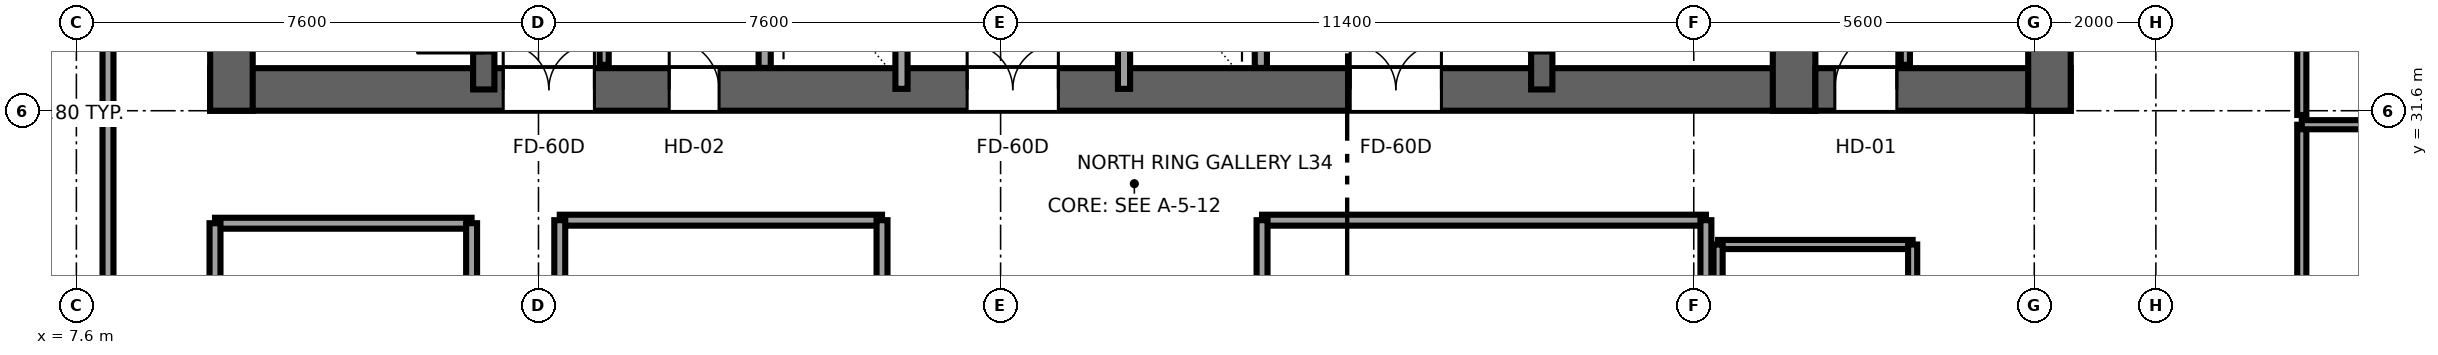
"""IFC4 building model, lengths in metres.
Left out: names, types, materials, properties, quantities, classifications, styles, units other than length and angle.
Written with IfcOpenShell. Run it as: python <this file> out.ifc"""

import sys

from ifc_helpers import new_model, si_unit, direction, frame, frame_2d, origin, place, context, subcontext, project, spatial, rectangle, extrude, source, transform, mapped, element, fill, save


model = new_model("IFC4")
c1 = context("Model", 3, precision=1e-05, world=origin(), true_north=direction((0.0, 1.0)))
c2 = subcontext(c1, "Body", "Model", "MODEL_VIEW")
j1 = project(units=[si_unit("LENGTHUNIT", "METRE"), si_unit("PLANEANGLEUNIT", "RADIAN")], contexts=[c1])
p1 = place(None, origin())
s1 = spatial("IfcSite", under=j1, at=p1, CompositionType="ELEMENT")
p2 = place(p1, origin())
s2 = spatial("IfcBuilding", under=s1, at=p2, CompositionType="ELEMENT")
p3 = place(p2, frame((0.0, 0.0, 132.85)))
s3 = spatial("IfcBuildingStorey", under=s2, at=p3, CompositionType="ELEMENT", Elevation=132.85)
p4 = place(p3, frame((9.8, 31.95, 0.0), z_axis=(0.0, 0.0, 1.0), x_axis=(1.0, 0.0, 0.0)))
e1 = element("IfcWall", 1, at=p4, inside=s3, PredefinedType="SHEAR", context=c2, shape_type="SweptSolid", body=[
    extrude(rectangle(XDim=26.4, YDim=0.7, at=frame_2d((13.2, 0.0))), origin(), (0.0, 0.0, 1.0), 3.55),
])
p5 = place(p4, frame((6.32, 0.0, 0.0), z_axis=(0.0, 0.0, 1.0), x_axis=(-1.0, 0.0, 0.0)))
e2 = element("IfcOpeningElement", 2, at=p5, cuts=e1, PredefinedType="OPENING", context=c2, shape_type="SweptSolid", body=[
    extrude(rectangle(XDim=1.5, YDim=2.04, at=frame_2d((0.75, 1.02))), frame((0.0, 0.36, 0.0), z_axis=(0.0, -1.0, 0.0), x_axis=(1.0, 0.0, 0.0)), (0.0, 0.0, 1.0), 0.72),
])
p6 = place(p4, frame((13.95, 0.0, 0.0), z_axis=(0.0, 0.0, 1.0), x_axis=(-1.0, 0.0, 0.0)))
e3 = element("IfcOpeningElement", 3, at=p6, cuts=e1, PredefinedType="OPENING", context=c2, shape_type="SweptSolid", body=[
    extrude(rectangle(XDim=1.5, YDim=2.04, at=frame_2d((0.75, 1.02))), frame((0.0, 0.36, 0.0), z_axis=(0.0, -1.0, 0.0), x_axis=(1.0, 0.0, 0.0)), (0.0, 0.0, 1.0), 0.72),
])
p7 = place(p4, frame((20.25, 0.0, 0.0), z_axis=(0.0, 0.0, 1.0), x_axis=(-1.0, 0.0, 0.0)))
e4 = element("IfcOpeningElement", 4, at=p7, cuts=e1, PredefinedType="OPENING", context=c2, shape_type="SweptSolid", body=[
    extrude(rectangle(XDim=1.5, YDim=2.04, at=frame_2d((0.75, 1.02))), frame((0.0, 0.36, 0.0), z_axis=(0.0, -1.0, 0.0), x_axis=(1.0, 0.0, 0.0)), (0.0, 0.0, 1.0), 0.72),
])
p8 = place(p4, frame((8.37, 0.0, 0.0), z_axis=(0.0, 0.0, 1.0), x_axis=(-1.0, 0.0, 0.0)))
e5 = element("IfcOpeningElement", 5, at=p8, cuts=e1, PredefinedType="OPENING", context=c2, shape_type="SweptSolid", body=[
    extrude(rectangle(XDim=0.82, YDim=2.01, at=frame_2d((0.41, 1.005))), frame((0.0, 0.36, 0.0), z_axis=(0.0, -1.0, 0.0), x_axis=(1.0, 0.0, 0.0)), (0.0, 0.0, 1.0), 0.72),
])
for number, where, z_axis, x_axis in (
    (6, (10.15, 31.6, 0.0), (0.0, 0.0, 1.0), (0.0, 1.0, 0.0)),
    (7, (35.85, 31.6, 0.0), (0.0, 0.0, 1.0), (0.0, 1.0, 0.0)),
):
    element("IfcWall", number, at=place(p3, frame(where, z_axis=z_axis, x_axis=x_axis)), inside=s3, PredefinedType="SHEAR", context=c2, shape_type="SweptSolid", body=[
        extrude(rectangle(XDim=13.6, YDim=0.7, at=frame_2d((6.8, 0.0))), origin(), (0.0, 0.0, 1.0), 3.55),
    ])
p9 = place(p3, frame((14.3, 31.95, 0.0), z_axis=(0.0, 0.0, 1.0), x_axis=(0.0, 1.0, 0.0)))
e8 = element("IfcWall", 8, at=p9, inside=s3, PredefinedType="SHEAR", context=c2, shape_type="SweptSolid", body=[
    extrude(rectangle(XDim=12.9, YDim=0.35, at=frame_2d((6.45, 0.0))), origin(), (0.0, 0.0, 1.0), 3.55),
])
p10 = place(p9, frame((0.6, 0.0, 0.0)))
e9 = element("IfcOpeningElement", 9, at=p10, cuts=e8, PredefinedType="OPENING", context=c2, shape_type="SweptSolid", body=[
    extrude(rectangle(XDim=1.1, YDim=2.12, at=frame_2d((0.55, 1.06))), frame((0.0, 0.185, 0.0), z_axis=(0.0, -1.0, 0.0), x_axis=(1.0, 0.0, 0.0)), (0.0, 0.0, 1.0), 0.37),
])
p11 = place(p3, frame((31.7, 31.95, 0.0), z_axis=(0.0, 0.0, 1.0), x_axis=(0.0, 1.0, 0.0)))
e10 = element("IfcWall", 10, at=p11, inside=s3, PredefinedType="SHEAR", context=c2, shape_type="SweptSolid", body=[
    extrude(rectangle(XDim=12.9, YDim=0.35, at=frame_2d((6.45, 0.0))), origin(), (0.0, 0.0, 1.0), 3.55),
])
p12 = place(p11, frame((1.7, 0.0, 0.0), z_axis=(0.0, 0.0, 1.0), x_axis=(-1.0, 0.0, 0.0)))
e11 = element("IfcOpeningElement", 11, at=p12, cuts=e10, PredefinedType="OPENING", context=c2, shape_type="SweptSolid", body=[
    extrude(rectangle(XDim=1.1, YDim=2.12, at=frame_2d((0.55, 1.06))), frame((0.0, 0.185, 0.0), z_axis=(0.0, -1.0, 0.0), x_axis=(1.0, 0.0, 0.0)), (0.0, 0.0, 1.0), 0.37),
])
p13 = place(p3, frame((36.2, 31.95, 0.0), z_axis=(0.0, 0.0, 1.0), x_axis=(1.0, 0.0, 0.0)))
e12 = element("IfcWall", 12, at=p13, inside=s3, PredefinedType="SHEAR", context=c2, shape_type="SweptSolid", body=[
    extrude(rectangle(XDim=4.2, YDim=0.7, at=frame_2d((2.1, 0.0))), origin(), (0.0, 0.0, 1.0), 3.55),
])
p14 = place(p13, frame((1.34, 0.0, 0.0), z_axis=(0.0, 0.0, 1.0), x_axis=(-1.0, 0.0, 0.0)))
e13 = element("IfcOpeningElement", 13, at=p14, cuts=e12, PredefinedType="OPENING", context=c2, shape_type="SweptSolid", body=[
    extrude(rectangle(XDim=1.02, YDim=2.03, at=frame_2d((0.51, 1.015))), frame((0.0, 0.36, 0.0), z_axis=(0.0, -1.0, 0.0), x_axis=(1.0, 0.0, 0.0)), (0.0, 0.0, 1.0), 0.72),
])
p15 = place(p3, frame((40.05, 31.6, 0.0), z_axis=(0.0, 0.0, 1.0), x_axis=(0.0, 1.0, 0.0)))
e14 = element("IfcWall", 14, at=p15, inside=s3, PredefinedType="SHEAR", context=c2, shape_type="SweptSolid", body=[
    extrude(rectangle(XDim=13.6, YDim=0.7, at=frame_2d((6.8, 0.0))), origin(), (0.0, 0.0, 1.0), 3.55),
])
for number, where, z_axis, x_axis in (
    (15, (18.92, 32.304, 0.0), (0.0, 0.0, 1.0), (0.0, 1.0, 0.0)),
    (16, (27.08, 32.304, 0.0), (0.0, 0.0, 1.0), (0.0, 1.0, 0.0)),
):
    element("IfcWall", number, at=place(p3, frame(where, z_axis=z_axis, x_axis=x_axis)), inside=s3, PredefinedType="SOLIDWALL", context=c2, shape_type="SweptSolid", body=[
        extrude(rectangle(XDim=3.846, YDim=0.2, at=frame_2d((1.923, 0.0))), origin(), (0.0, 0.0, 1.0), 3.37),
    ])
p16 = place(p3, frame((21.17, 31.96, 0.0), z_axis=(0.0, 0.0, 1.0), x_axis=(0.0, 1.0, 0.0)))
e17 = element("IfcWall", 17, at=p16, inside=s3, PredefinedType="SOLIDWALL", context=c2, shape_type="SweptSolid", body=[
    extrude(rectangle(XDim=12.58, YDim=0.2, at=frame_2d((6.29, 0.0))), origin(), (0.0, 0.0, 1.0), 3.37),
])
p17 = place(p16, frame((5.74, 0.0, 0.0)))
e18 = element("IfcOpeningElement", 18, at=p17, cuts=e17, PredefinedType="OPENING", context=c2, shape_type="SweptSolid", body=[
    extrude(rectangle(XDim=1.1, YDim=2.12, at=frame_2d((0.55, 1.06))), frame((0.0, 0.11, 0.0), z_axis=(0.0, -1.0, 0.0), x_axis=(1.0, 0.0, 0.0)), (0.0, 0.0, 1.0), 0.22),
])
p18 = place(p16, frame((8.24, 0.0, 0.0)))
e19 = element("IfcOpeningElement", 19, at=p18, cuts=e17, PredefinedType="OPENING", context=c2, shape_type="SweptSolid", body=[
    extrude(rectangle(XDim=1.1, YDim=2.12, at=frame_2d((0.55, 1.06))), frame((0.0, 0.11, 0.0), z_axis=(0.0, -1.0, 0.0), x_axis=(1.0, 0.0, 0.0)), (0.0, 0.0, 1.0), 0.22),
])
p19 = place(p3, frame((24.83, 31.96, 0.0), z_axis=(0.0, 0.0, 1.0), x_axis=(0.0, 1.0, 0.0)))
e20 = element("IfcWall", 20, at=p19, inside=s3, PredefinedType="SOLIDWALL", context=c2, shape_type="SweptSolid", body=[
    extrude(rectangle(XDim=12.58, YDim=0.2, at=frame_2d((6.29, 0.0))), origin(), (0.0, 0.0, 1.0), 3.37),
])
p20 = place(p19, frame((5.74, 0.0, 0.0)))
e21 = element("IfcOpeningElement", 21, at=p20, cuts=e20, PredefinedType="OPENING", context=c2, shape_type="SweptSolid", body=[
    extrude(rectangle(XDim=1.1, YDim=2.12, at=frame_2d((0.55, 1.06))), frame((0.0, 0.11, 0.0), z_axis=(0.0, -1.0, 0.0), x_axis=(1.0, 0.0, 0.0)), (0.0, 0.0, 1.0), 0.22),
])
p21 = place(p19, frame((8.24, 0.0, 0.0)))
e22 = element("IfcOpeningElement", 22, at=p21, cuts=e20, PredefinedType="OPENING", context=c2, shape_type="SweptSolid", body=[
    extrude(rectangle(XDim=1.1, YDim=2.12, at=frame_2d((0.55, 1.06))), frame((0.0, 0.11, 0.0), z_axis=(0.0, -1.0, 0.0), x_axis=(1.0, 0.0, 0.0)), (0.0, 0.0, 1.0), 0.22),
])
p22 = place(p3, frame((16.28, 32.355, 0.0), z_axis=(0.0, 0.0, 1.0), x_axis=(0.0, 1.0, 0.0)))
e23 = element("IfcWall", 23, at=p22, inside=s3, PredefinedType="PARTITIONING", context=c2, shape_type="SweptSolid", body=[
    extrude(rectangle(XDim=0.865, YDim=0.15, at=frame_2d((0.433, 0.0))), origin(), (0.0, 0.0, 1.0), 3.37),
])
p23 = place(p3, frame((37.68, 32.355, 0.0), z_axis=(0.0, 0.0, 1.0), x_axis=(0.0, 1.0, 0.0)))
e24 = element("IfcWall", 24, at=p23, inside=s3, PredefinedType="PARTITIONING", context=c2, shape_type="SweptSolid", body=[
    extrude(rectangle(XDim=3.845, YDim=0.15, at=frame_2d((1.922, 0.0))), origin(), (0.0, 0.0, 1.0), 3.37),
])
p24 = place(p23, frame((1.413, 0.0, 0.0)))
e25 = element("IfcOpeningElement", 25, at=p24, cuts=e24, PredefinedType="OPENING", context=c2, shape_type="SweptSolid", body=[
    extrude(rectangle(XDim=1.02, YDim=2.03, at=frame_2d((0.51, 1.015))), frame((0.0, 0.085, 0.0), z_axis=(0.0, -1.0, 0.0), x_axis=(1.0, 0.0, 0.0)), (0.0, 0.0, 1.0), 0.17),
])
p25 = place(p3, frame((8.12, 22.3, 0.0), z_axis=(0.0, 0.0, 1.0), x_axis=(0.0, 1.0, 0.0)))
e26 = element("IfcWall", 26, at=p25, inside=s3, PredefinedType="PARTITIONING", context=c2, shape_type="SweptSolid", body=[
    extrude(rectangle(XDim=13.5, YDim=0.18, at=frame_2d((6.75, 0.0))), origin(), (0.0, 0.0, 1.0), 3.37),
])
p26 = place(p25, frame((3.35, 0.0, 0.0)))
e27 = element("IfcOpeningElement", 27, at=p26, cuts=e26, PredefinedType="OPENING", context=c2, shape_type="SweptSolid", body=[
    extrude(rectangle(XDim=1.65, YDim=2.15, at=frame_2d((0.825, 1.075))), frame((0.0, 0.1, 0.0), z_axis=(0.0, -1.0, 0.0), x_axis=(1.0, 0.0, 0.0)), (0.0, 0.0, 1.0), 0.2),
])
p27 = place(p3, frame((44.2, 22.38, 0.0), z_axis=(0.0, 0.0, 1.0), x_axis=(0.0, 1.0, 0.0)))
e28 = element("IfcWall", 28, at=p27, inside=s3, PredefinedType="PARTITIONING", context=c2, shape_type="SweptSolid", body=[
    extrude(rectangle(XDim=8.99, YDim=0.15, at=frame_2d((4.495, 0.0))), origin(), (0.0, 0.0, 1.0), 3.37),
])
p28 = place(p27, frame((4.005, 0.0, 0.0)))
e29 = element("IfcOpeningElement", 29, at=p28, cuts=e28, PredefinedType="OPENING", context=c2, shape_type="SweptSolid", body=[
    extrude(rectangle(XDim=0.98, YDim=2.12, at=frame_2d((0.49, 1.06))), frame((0.0, 0.085, 0.0), z_axis=(0.0, -1.0, 0.0), x_axis=(1.0, 0.0, 0.0)), (0.0, 0.0, 1.0), 0.17),
])
p29 = place(p3, frame((44.2, 31.37, 0.0), z_axis=(0.0, 0.0, 1.0), x_axis=(1.0, 0.0, 0.0)))
e30 = element("IfcWall", 30, at=p29, inside=s3, PredefinedType="PARTITIONING", context=c2, shape_type="SweptSolid", body=[
    extrude(rectangle(XDim=10.03, YDim=0.15, at=frame_2d((5.015, 0.0))), origin(), (0.0, 0.0, 1.0), 3.37),
])
p30 = place(p3, frame((44.2, 31.53, 0.0), z_axis=(0.0, 0.0, 1.0), x_axis=(0.0, 1.0, 0.0)))
e31 = element("IfcWall", 31, at=p30, inside=s3, PredefinedType="PARTITIONING", context=c2, shape_type="SweptSolid", body=[
    extrude(rectangle(XDim=8.99, YDim=0.15, at=frame_2d((4.495, 0.0))), origin(), (0.0, 0.0, 1.0), 3.37),
])
p31 = place(p30, frame((4.005, 0.0, 0.0)))
e32 = element("IfcOpeningElement", 32, at=p31, cuts=e31, PredefinedType="OPENING", context=c2, shape_type="SweptSolid", body=[
    extrude(rectangle(XDim=0.98, YDim=2.12, at=frame_2d((0.49, 1.06))), frame((0.0, 0.085, 0.0), z_axis=(0.0, -1.0, 0.0), x_axis=(1.0, 0.0, 0.0)), (0.0, 0.0, 1.0), 0.17),
])
p32 = place(p3, frame((9.88, 29.75, 0.0), z_axis=(0.0, 0.0, 1.0), x_axis=(1.0, 0.0, 0.0)))
e33 = element("IfcWall", 33, at=p32, inside=s3, PredefinedType="PARTITIONING", context=c2, shape_type="SweptSolid", body=[
    extrude(rectangle(XDim=4.22, YDim=0.18, at=frame_2d((2.11, 0.0))), origin(), (0.0, 0.0, 1.0), 3.37),
])
for number, where, z_axis, x_axis in (
    (34, (9.88, 22.3, 0.0), (0.0, 0.0, 1.0), (0.0, 1.0, 0.0)),
    (35, (14.1, 22.3, 0.0), (0.0, 0.0, 1.0), (0.0, 1.0, 0.0)),
):
    element("IfcWall", number, at=place(p3, frame(where, z_axis=z_axis, x_axis=x_axis)), inside=s3, PredefinedType="PARTITIONING", context=c2, shape_type="SweptSolid", body=[
        extrude(rectangle(XDim=7.45, YDim=0.18, at=frame_2d((3.725, 0.0))), origin(), (0.0, 0.0, 1.0), 3.37),
    ])
p33 = place(p3, frame((27.1, 29.8, 0.0), z_axis=(0.0, 0.0, 1.0), x_axis=(1.0, 0.0, 0.0)))
e36 = element("IfcWall", 36, at=p33, inside=s3, PredefinedType="PARTITIONING", context=c2, shape_type="SweptSolid", body=[
    extrude(rectangle(XDim=7.3, YDim=0.18, at=frame_2d((3.65, 0.0))), origin(), (0.0, 0.0, 1.0), 3.37),
])
for number, where, z_axis, x_axis in (
    (37, (27.1, 22.3, 0.0), (0.0, 0.0, 1.0), (0.0, 1.0, 0.0)),
    (38, (34.4, 22.3, 0.0), (0.0, 0.0, 1.0), (0.0, 1.0, 0.0)),
):
    element("IfcWall", number, at=place(p3, frame(where, z_axis=z_axis, x_axis=x_axis)), inside=s3, PredefinedType="PARTITIONING", context=c2, shape_type="SweptSolid", body=[
        extrude(rectangle(XDim=7.5, YDim=0.18, at=frame_2d((3.75, 0.0))), origin(), (0.0, 0.0, 1.0), 3.37),
    ])
p34 = place(p3, frame((15.55, 29.8, 0.0), z_axis=(0.0, 0.0, 1.0), x_axis=(1.0, 0.0, 0.0)))
e39 = element("IfcWall", 39, at=p34, inside=s3, PredefinedType="PARTITIONING", context=c2, shape_type="SweptSolid", body=[
    extrude(rectangle(XDim=5.3, YDim=0.18, at=frame_2d((2.65, 0.0))), origin(), (0.0, 0.0, 1.0), 3.37),
])
for number, where, z_axis, x_axis in (
    (40, (15.55, 22.3, 0.0), (0.0, 0.0, 1.0), (0.0, 1.0, 0.0)),
    (41, (20.85, 22.3, 0.0), (0.0, 0.0, 1.0), (0.0, 1.0, 0.0)),
):
    element("IfcWall", number, at=place(p3, frame(where, z_axis=z_axis, x_axis=x_axis)), inside=s3, PredefinedType="PARTITIONING", context=c2, shape_type="SweptSolid", body=[
        extrude(rectangle(XDim=7.5, YDim=0.18, at=frame_2d((3.75, 0.0))), origin(), (0.0, 0.0, 1.0), 3.37),
    ])
p35 = place(p3, frame((34.6, 29.4, 0.0), z_axis=(0.0, 0.0, 1.0), x_axis=(1.0, 0.0, 0.0)))
e42 = element("IfcWall", 42, at=p35, inside=s3, PredefinedType="PARTITIONING", context=c2, shape_type="SweptSolid", body=[
    extrude(rectangle(XDim=3.2, YDim=0.15, at=frame_2d((1.6, 0.0))), origin(), (0.0, 0.0, 1.0), 3.37),
])
for number, where, z_axis, x_axis in (
    (43, (34.6, 22.3, 0.0), (0.0, 0.0, 1.0), (0.0, 1.0, 0.0)),
    (44, (37.8, 22.3, 0.0), (0.0, 0.0, 1.0), (0.0, 1.0, 0.0)),
):
    element("IfcWall", number, at=place(p3, frame(where, z_axis=z_axis, x_axis=x_axis)), inside=s3, PredefinedType="PARTITIONING", context=c2, shape_type="SweptSolid", body=[
        extrude(rectangle(XDim=7.1, YDim=0.15, at=frame_2d((3.55, 0.0))), origin(), (0.0, 0.0, 1.0), 3.37),
    ])
m1 = source(origin(), c2, "Body", "SweptSolid", [
    extrude(rectangle(XDim=1.1, YDim=2.12, at=frame_2d((0.55, 1.06))), frame((0.0, 0.025, 0.0), z_axis=(0.0, -1.0, 0.0), x_axis=(1.0, 0.0, 0.0)), (0.0, 0.0, 1.0), 0.05),
])
p36 = place(p10, origin())
e45 = element("IfcDoor", 45, at=p36, inside=s3, OperationType="SINGLE_SWING_LEFT", PredefinedType="DOOR", context=c2, shape_type="MappedRepresentation", body=[
    mapped(m1, transform((0.0, 0.0, 0.0), x_axis=(1.0, 0.0, 0.0), y_axis=(0.0, 1.0, 0.0), z_axis=(0.0, 0.0, 1.0), scale=1.0)),
])
fill(e9, e45)
p37 = place(p12, origin())
e46 = element("IfcDoor", 46, at=p37, inside=s3, OperationType="SINGLE_SWING_RIGHT", PredefinedType="DOOR", context=c2, shape_type="MappedRepresentation", body=[
    mapped(m1, transform((0.0, 0.0, 0.0), x_axis=(1.0, 0.0, 0.0), y_axis=(0.0, 1.0, 0.0), z_axis=(0.0, 0.0, 1.0), scale=1.0)),
])
fill(e11, e46)
m2 = source(origin(), c2, "Body", "SweptSolid", [
    extrude(rectangle(XDim=1.5, YDim=2.04, at=frame_2d((0.75, 1.02))), frame((0.0, 0.025, 0.0), z_axis=(0.0, -1.0, 0.0), x_axis=(1.0, 0.0, 0.0)), (0.0, 0.0, 1.0), 0.05),
])
p38 = place(p5, origin())
e47 = element("IfcDoor", 47, at=p38, inside=s3, OperationType="DOUBLE_DOOR_SINGLE_SWING", PredefinedType="DOOR", context=c2, shape_type="MappedRepresentation", body=[
    mapped(m2, transform((0.0, 0.0, 0.0), x_axis=(1.0, 0.0, 0.0), y_axis=(0.0, 1.0, 0.0), z_axis=(0.0, 0.0, 1.0), scale=1.0)),
])
fill(e2, e47)
p39 = place(p6, origin())
e48 = element("IfcDoor", 48, at=p39, inside=s3, OperationType="DOUBLE_DOOR_SINGLE_SWING", PredefinedType="DOOR", context=c2, shape_type="MappedRepresentation", body=[
    mapped(m2, transform((0.0, 0.0, 0.0), x_axis=(1.0, 0.0, 0.0), y_axis=(0.0, 1.0, 0.0), z_axis=(0.0, 0.0, 1.0), scale=1.0)),
])
fill(e3, e48)
p40 = place(p7, origin())
e49 = element("IfcDoor", 49, at=p40, inside=s3, OperationType="DOUBLE_DOOR_SINGLE_SWING", PredefinedType="DOOR", context=c2, shape_type="MappedRepresentation", body=[
    mapped(m2, transform((0.0, 0.0, 0.0), x_axis=(1.0, 0.0, 0.0), y_axis=(0.0, 1.0, 0.0), z_axis=(0.0, 0.0, 1.0), scale=1.0)),
])
fill(e4, e49)
m3 = source(origin(), c2, "Body", "SweptSolid", [
    extrude(rectangle(XDim=0.82, YDim=2.01, at=frame_2d((0.41, 1.005))), frame((0.0, 0.025, 0.0), z_axis=(0.0, -1.0, 0.0), x_axis=(1.0, 0.0, 0.0)), (0.0, 0.0, 1.0), 0.05),
])
p41 = place(p8, origin())
e50 = element("IfcDoor", 50, at=p41, inside=s3, OperationType="SINGLE_SWING_LEFT", PredefinedType="DOOR", context=c2, shape_type="MappedRepresentation", body=[
    mapped(m3, transform((0.0, 0.0, 0.0), x_axis=(1.0, 0.0, 0.0), y_axis=(0.0, 1.0, 0.0), z_axis=(0.0, 0.0, 1.0), scale=1.0)),
])
fill(e5, e50)
m4 = source(origin(), c2, "Body", "SweptSolid", [
    extrude(rectangle(XDim=1.02, YDim=2.03, at=frame_2d((0.51, 1.015))), frame((0.0, 0.025, 0.0), z_axis=(0.0, -1.0, 0.0), x_axis=(1.0, 0.0, 0.0)), (0.0, 0.0, 1.0), 0.05),
])
p42 = place(p14, origin())
e51 = element("IfcDoor", 51, at=p42, inside=s3, OperationType="SINGLE_SWING_RIGHT", PredefinedType="DOOR", context=c2, shape_type="MappedRepresentation", body=[
    mapped(m4, transform((0.0, 0.0, 0.0), x_axis=(1.0, 0.0, 0.0), y_axis=(0.0, 1.0, 0.0), z_axis=(0.0, 0.0, 1.0), scale=1.0)),
])
fill(e13, e51)
save(model, sys.argv[1])
